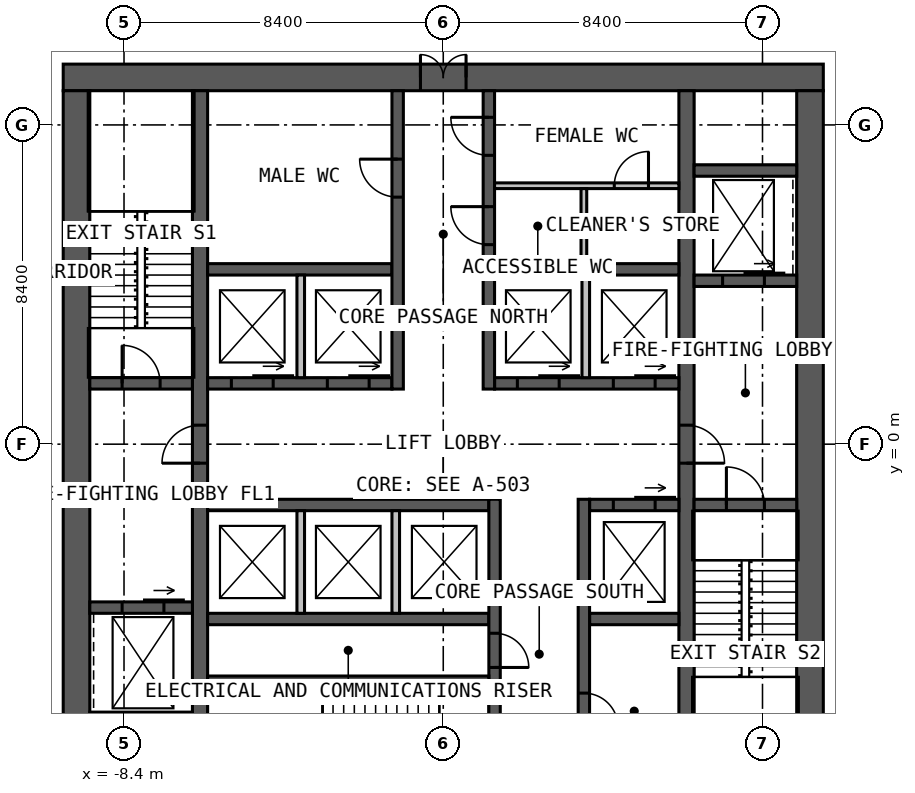
"""IFC4 building model, lengths in metres.
Left out: names, types, materials, properties, quantities, classifications, styles, units other than length and angle.
Written with IfcOpenShell. Run it as: python <this file> out.ifc"""

import sys

from ifc_helpers import new_model, si_unit, direction, frame, frame_2d, origin, place, context, subcontext, project, spatial, rectangle, extrude, element, fill, save


model = new_model("IFC4")
c1 = context("Model", 3, precision=1e-05, world=origin(), true_north=direction((0.0, 1.0)))
c2 = subcontext(c1, "Body", "Model", "MODEL_VIEW")
j1 = project(units=[si_unit("LENGTHUNIT", "METRE"), si_unit("PLANEANGLEUNIT", "RADIAN")], contexts=[c1])
p1 = place(None, origin())
s1 = spatial("IfcSite", under=j1, at=p1, CompositionType="ELEMENT")
p2 = place(p1, origin())
s2 = spatial("IfcBuilding", under=s1, at=p2, CompositionType="ELEMENT")
p3 = place(p2, frame((0.0, 0.0, 94.0)))
s3 = spatial("IfcBuildingStorey", under=s2, at=p3, CompositionType="ELEMENT", Elevation=94.0)
p4 = place(p3, frame((-10.0, 9.65, 0.0), z_axis=(0.0, 0.0, 1.0), x_axis=(1.0, 0.0, 0.0)))
e1 = element("IfcWall", 1, at=p4, inside=s3, PredefinedType="SOLIDWALL", context=c2, shape_type="SweptSolid", body=[
    extrude(rectangle(XDim=20.0, YDim=0.7, at=frame_2d((10.0, 0.0))), origin(), (0.0, 0.0, 1.0), 4.0),
])
p5 = place(p4, frame((9.4, 0.0, 0.0)))
e2 = element("IfcOpeningElement", 2, at=p5, cuts=e1, PredefinedType="OPENING", context=c2, shape_type="SweptSolid", body=[
    extrude(rectangle(XDim=1.2, YDim=2.2, at=frame_2d((0.6, 1.1))), frame((0.0, 0.36, 0.0), z_axis=(0.0, -1.0, 0.0), x_axis=(1.0, 0.0, 0.0)), (0.0, 0.0, 1.0), 0.72),
])
for number, where, z_axis, x_axis in (
    (3, (9.65, -9.3, 0.0), (0.0, 0.0, 1.0), (0.0, 1.0, 0.0)),
    (4, (-9.65, 9.3, 0.0), (0.0, 0.0, 1.0), (0.0, -1.0, 0.0)),
):
    element("IfcWall", number, at=place(p3, frame(where, z_axis=z_axis, x_axis=x_axis)), inside=s3, PredefinedType="SOLIDWALL", context=c2, shape_type="SweptSolid", body=[
        extrude(rectangle(XDim=18.6, YDim=0.7, at=frame_2d((9.3, 0.0))), origin(), (0.0, 0.0, 1.0), 4.0),
    ])
p6 = place(p3, frame((-6.4, -9.3, 0.0), z_axis=(0.0, 0.0, 1.0), x_axis=(0.0, 1.0, 0.0)))
e5 = element("IfcWall", 5, at=p6, inside=s3, PredefinedType="SOLIDWALL", context=c2, shape_type="SweptSolid", body=[
    extrude(rectangle(XDim=18.6, YDim=0.4, at=frame_2d((9.3, 0.0))), origin(), (0.0, 0.0, 1.0), 4.0),
])
p7 = place(p6, frame((8.8, 0.0, 0.0)))
e6 = element("IfcOpeningElement", 6, at=p7, cuts=e5, PredefinedType="OPENING", context=c2, shape_type="SweptSolid", body=[
    extrude(rectangle(XDim=1.0, YDim=2.2, at=frame_2d((0.5, 1.1))), frame((0.0, 0.21, 0.0), z_axis=(0.0, -1.0, 0.0), x_axis=(1.0, 0.0, 0.0)), (0.0, 0.0, 1.0), 0.42),
])
p8 = place(p3, frame((6.4, 9.3, 0.0), z_axis=(0.0, 0.0, 1.0), x_axis=(0.0, -1.0, 0.0)))
e7 = element("IfcWall", 7, at=p8, inside=s3, PredefinedType="SOLIDWALL", context=c2, shape_type="SweptSolid", body=[
    extrude(rectangle(XDim=18.6, YDim=0.4, at=frame_2d((9.3, 0.0))), origin(), (0.0, 0.0, 1.0), 4.0),
])
p9 = place(p8, frame((8.8, 0.0, 0.0)))
e8 = element("IfcOpeningElement", 8, at=p9, cuts=e7, PredefinedType="OPENING", context=c2, shape_type="SweptSolid", body=[
    extrude(rectangle(XDim=1.0, YDim=2.2, at=frame_2d((0.5, 1.1))), frame((0.0, 0.21, 0.0), z_axis=(0.0, -1.0, 0.0), x_axis=(1.0, 0.0, 0.0)), (0.0, 0.0, 1.0), 0.42),
])
p10 = place(p3, frame((-6.2, 1.6, 0.0), z_axis=(0.0, 0.0, 1.0), x_axis=(1.0, 0.0, 0.0)))
e9 = element("IfcWall", 9, at=p10, inside=s3, PredefinedType="SOLIDWALL", context=c2, shape_type="SweptSolid", body=[
    extrude(rectangle(XDim=4.85, YDim=0.3, at=frame_2d((2.425, 0.0))), origin(), (0.0, 0.0, 1.0), 4.0),
])
p11 = place(p10, frame((0.625, 0.0, 0.0)))
e10 = element("IfcOpeningElement", 10, at=p11, cuts=e9, PredefinedType="OPENING", context=c2, shape_type="SweptSolid", body=[
    extrude(rectangle(XDim=1.1, YDim=2.2, at=frame_2d((0.55, 1.1))), frame((0.0, 0.16, 0.0), z_axis=(0.0, -1.0, 0.0), x_axis=(1.0, 0.0, 0.0)), (0.0, 0.0, 1.0), 0.32),
])
p12 = place(p10, frame((3.15, 0.0, 0.0)))
e11 = element("IfcOpeningElement", 11, at=p12, cuts=e9, PredefinedType="OPENING", context=c2, shape_type="SweptSolid", body=[
    extrude(rectangle(XDim=1.1, YDim=2.2, at=frame_2d((0.55, 1.1))), frame((0.0, 0.16, 0.0), z_axis=(0.0, -1.0, 0.0), x_axis=(1.0, 0.0, 0.0)), (0.0, 0.0, 1.0), 0.32),
])
p13 = place(p3, frame((1.35, 1.6, 0.0), z_axis=(0.0, 0.0, 1.0), x_axis=(1.0, 0.0, 0.0)))
e12 = element("IfcWall", 12, at=p13, inside=s3, PredefinedType="SOLIDWALL", context=c2, shape_type="SweptSolid", body=[
    extrude(rectangle(XDim=4.85, YDim=0.3, at=frame_2d((2.425, 0.0))), origin(), (0.0, 0.0, 1.0), 4.0),
])
p14 = place(p13, frame((0.6, 0.0, 0.0)))
e13 = element("IfcOpeningElement", 13, at=p14, cuts=e12, PredefinedType="OPENING", context=c2, shape_type="SweptSolid", body=[
    extrude(rectangle(XDim=1.1, YDim=2.2, at=frame_2d((0.55, 1.1))), frame((0.0, 0.16, 0.0), z_axis=(0.0, -1.0, 0.0), x_axis=(1.0, 0.0, 0.0)), (0.0, 0.0, 1.0), 0.32),
])
p15 = place(p13, frame((3.125, 0.0, 0.0)))
e14 = element("IfcOpeningElement", 14, at=p15, cuts=e12, PredefinedType="OPENING", context=c2, shape_type="SweptSolid", body=[
    extrude(rectangle(XDim=1.1, YDim=2.2, at=frame_2d((0.55, 1.1))), frame((0.0, 0.16, 0.0), z_axis=(0.0, -1.0, 0.0), x_axis=(1.0, 0.0, 0.0)), (0.0, 0.0, 1.0), 0.32),
])
for number, where, z_axis, x_axis in (
    (15, (-6.2, 4.6, 0.0), (0.0, 0.0, 1.0), (1.0, 0.0, 0.0)),
    (16, (1.35, 4.6, 0.0), (0.0, 0.0, 1.0), (1.0, 0.0, 0.0)),
):
    element("IfcWall", number, at=place(p3, frame(where, z_axis=z_axis, x_axis=x_axis)), inside=s3, PredefinedType="SOLIDWALL", context=c2, shape_type="SweptSolid", body=[
        extrude(rectangle(XDim=4.85, YDim=0.3, at=frame_2d((2.425, 0.0))), origin(), (0.0, 0.0, 1.0), 4.0),
    ])
p16 = place(p3, frame((-1.2, 1.45, 0.0), z_axis=(0.0, 0.0, 1.0), x_axis=(0.0, 1.0, 0.0)))
e17 = element("IfcWall", 17, at=p16, inside=s3, PredefinedType="SOLIDWALL", context=c2, shape_type="SweptSolid", body=[
    extrude(rectangle(XDim=7.85, YDim=0.3, at=frame_2d((3.925, 0.0))), origin(), (0.0, 0.0, 1.0), 4.0),
])
p17 = place(p16, frame((5.05, 0.0, 0.0)))
e18 = element("IfcOpeningElement", 18, at=p17, cuts=e17, PredefinedType="OPENING", context=c2, shape_type="SweptSolid", body=[
    extrude(rectangle(XDim=1.0, YDim=2.2, at=frame_2d((0.5, 1.1))), frame((0.0, 0.16, 0.0), z_axis=(0.0, -1.0, 0.0), x_axis=(1.0, 0.0, 0.0)), (0.0, 0.0, 1.0), 0.32),
])
p18 = place(p3, frame((1.2, 1.45, 0.0), z_axis=(0.0, 0.0, 1.0), x_axis=(0.0, 1.0, 0.0)))
e19 = element("IfcWall", 19, at=p18, inside=s3, PredefinedType="SOLIDWALL", context=c2, shape_type="SweptSolid", body=[
    extrude(rectangle(XDim=7.85, YDim=0.3, at=frame_2d((3.925, 0.0))), origin(), (0.0, 0.0, 1.0), 4.0),
])
p19 = place(p18, frame((3.8, 0.0, 0.0)))
e20 = element("IfcOpeningElement", 20, at=p19, cuts=e19, PredefinedType="OPENING", context=c2, shape_type="SweptSolid", body=[
    extrude(rectangle(XDim=1.0, YDim=2.2, at=frame_2d((0.5, 1.1))), frame((0.0, 0.16, 0.0), z_axis=(0.0, -1.0, 0.0), x_axis=(1.0, 0.0, 0.0)), (0.0, 0.0, 1.0), 0.32),
])
p20 = place(p18, frame((6.15, 0.0, 0.0)))
e21 = element("IfcOpeningElement", 21, at=p20, cuts=e19, PredefinedType="OPENING", context=c2, shape_type="SweptSolid", body=[
    extrude(rectangle(XDim=1.0, YDim=2.2, at=frame_2d((0.5, 1.1))), frame((0.0, 0.16, 0.0), z_axis=(0.0, -1.0, 0.0), x_axis=(1.0, 0.0, 0.0)), (0.0, 0.0, 1.0), 0.32),
])
p21 = place(p3, frame((-6.2, -1.6, 0.0), z_axis=(0.0, 0.0, 1.0), x_axis=(1.0, 0.0, 0.0)))
e22 = element("IfcWall", 22, at=p21, inside=s3, PredefinedType="SOLIDWALL", context=c2, shape_type="SweptSolid", body=[
    extrude(rectangle(XDim=7.4, YDim=0.3, at=frame_2d((3.7, 0.0))), origin(), (0.0, 0.0, 1.0), 4.0),
])
p22 = place(p3, frame((3.85, -1.6, 0.0), z_axis=(0.0, 0.0, 1.0), x_axis=(1.0, 0.0, 0.0)))
e23 = element("IfcWall", 23, at=p22, inside=s3, PredefinedType="SOLIDWALL", context=c2, shape_type="SweptSolid", body=[
    extrude(rectangle(XDim=2.35, YDim=0.3, at=frame_2d((1.175, 0.0))), origin(), (0.0, 0.0, 1.0), 4.0),
])
p23 = place(p22, frame((0.625, 0.0, 0.0)))
e24 = element("IfcOpeningElement", 24, at=p23, cuts=e23, PredefinedType="OPENING", context=c2, shape_type="SweptSolid", body=[
    extrude(rectangle(XDim=1.1, YDim=2.2, at=frame_2d((0.55, 1.1))), frame((0.0, 0.16, 0.0), z_axis=(0.0, -1.0, 0.0), x_axis=(1.0, 0.0, 0.0)), (0.0, 0.0, 1.0), 0.32),
])
p24 = place(p3, frame((-6.2, -4.6, 0.0), z_axis=(0.0, 0.0, 1.0), x_axis=(1.0, 0.0, 0.0)))
e25 = element("IfcWall", 25, at=p24, inside=s3, PredefinedType="SOLIDWALL", context=c2, shape_type="SweptSolid", body=[
    extrude(rectangle(XDim=7.4, YDim=0.3, at=frame_2d((3.7, 0.0))), origin(), (0.0, 0.0, 1.0), 4.0),
])
p25 = place(p3, frame((3.85, -4.6, 0.0), z_axis=(0.0, 0.0, 1.0), x_axis=(1.0, 0.0, 0.0)))
e26 = element("IfcWall", 26, at=p25, inside=s3, PredefinedType="SOLIDWALL", context=c2, shape_type="SweptSolid", body=[
    extrude(rectangle(XDim=2.35, YDim=0.3, at=frame_2d((1.175, 0.0))), origin(), (0.0, 0.0, 1.0), 4.0),
])
p26 = place(p3, frame((1.35, -1.45, 0.0), z_axis=(0.0, 0.0, 1.0), x_axis=(0.0, -1.0, 0.0)))
e27 = element("IfcWall", 27, at=p26, inside=s3, PredefinedType="SOLIDWALL", context=c2, shape_type="SweptSolid", body=[
    extrude(rectangle(XDim=7.85, YDim=0.3, at=frame_2d((3.925, 0.0))), origin(), (0.0, 0.0, 1.0), 4.0),
])
p27 = place(p26, frame((5.85, 0.0, 0.0)))
e28 = element("IfcOpeningElement", 28, at=p27, cuts=e27, PredefinedType="OPENING", context=c2, shape_type="SweptSolid", body=[
    extrude(rectangle(XDim=1.0, YDim=2.2, at=frame_2d((0.5, 1.1))), frame((0.0, 0.16, 0.0), z_axis=(0.0, -1.0, 0.0), x_axis=(1.0, 0.0, 0.0)), (0.0, 0.0, 1.0), 0.32),
])
p28 = place(p26, frame((3.525, 0.0, 0.0)))
e29 = element("IfcOpeningElement", 29, at=p28, cuts=e27, PredefinedType="OPENING", context=c2, shape_type="SweptSolid", body=[
    extrude(rectangle(XDim=0.9, YDim=2.2, at=frame_2d((0.45, 1.1))), frame((0.0, 0.16, 0.0), z_axis=(0.0, -1.0, 0.0), x_axis=(1.0, 0.0, 0.0)), (0.0, 0.0, 1.0), 0.32),
])
p29 = place(p3, frame((3.7, -1.45, 0.0), z_axis=(0.0, 0.0, 1.0), x_axis=(0.0, -1.0, 0.0)))
e30 = element("IfcWall", 30, at=p29, inside=s3, PredefinedType="SOLIDWALL", context=c2, shape_type="SweptSolid", body=[
    extrude(rectangle(XDim=7.85, YDim=0.3, at=frame_2d((3.925, 0.0))), origin(), (0.0, 0.0, 1.0), 4.0),
])
p30 = place(p29, frame((5.1, 0.0, 0.0)))
e31 = element("IfcOpeningElement", 31, at=p30, cuts=e30, PredefinedType="OPENING", context=c2, shape_type="SweptSolid", body=[
    extrude(rectangle(XDim=0.9, YDim=2.2, at=frame_2d((0.45, 1.1))), frame((0.0, 0.16, 0.0), z_axis=(0.0, -1.0, 0.0), x_axis=(1.0, 0.0, 0.0)), (0.0, 0.0, 1.0), 0.32),
])
p31 = place(p3, frame((-6.2, -6.2, 0.0), z_axis=(0.0, 0.0, 1.0), x_axis=(1.0, 0.0, 0.0)))
e32 = element("IfcWall", 32, at=p31, inside=s3, PredefinedType="SOLIDWALL", context=c2, shape_type="SweptSolid", body=[
    extrude(rectangle(XDim=7.4, YDim=0.2, at=frame_2d((3.7, 0.0))), origin(), (0.0, 0.0, 1.0), 4.0),
])
p32 = place(p3, frame((-9.3, 1.6, 0.0), z_axis=(0.0, 0.0, 1.0), x_axis=(1.0, 0.0, 0.0)))
e33 = element("IfcWall", 33, at=p32, inside=s3, PredefinedType="SOLIDWALL", context=c2, shape_type="SweptSolid", body=[
    extrude(rectangle(XDim=2.7, YDim=0.3, at=frame_2d((1.35, 0.0))), origin(), (0.0, 0.0, 1.0), 4.0),
])
p33 = place(p32, frame((0.85, 0.0, 0.0)))
e34 = element("IfcOpeningElement", 34, at=p33, cuts=e33, PredefinedType="OPENING", context=c2, shape_type="SweptSolid", body=[
    extrude(rectangle(XDim=1.0, YDim=2.2, at=frame_2d((0.5, 1.1))), frame((0.0, 0.16, 0.0), z_axis=(0.0, -1.0, 0.0), x_axis=(1.0, 0.0, 0.0)), (0.0, 0.0, 1.0), 0.32),
])
p34 = place(p3, frame((6.6, -1.6, 0.0), z_axis=(0.0, 0.0, 1.0), x_axis=(1.0, 0.0, 0.0)))
e35 = element("IfcWall", 35, at=p34, inside=s3, PredefinedType="SOLIDWALL", context=c2, shape_type="SweptSolid", body=[
    extrude(rectangle(XDim=2.7, YDim=0.3, at=frame_2d((1.35, 0.0))), origin(), (0.0, 0.0, 1.0), 4.0),
])
p35 = place(p34, frame((0.85, 0.0, 0.0)))
e36 = element("IfcOpeningElement", 36, at=p35, cuts=e35, PredefinedType="OPENING", context=c2, shape_type="SweptSolid", body=[
    extrude(rectangle(XDim=1.0, YDim=2.2, at=frame_2d((0.5, 1.1))), frame((0.0, 0.16, 0.0), z_axis=(0.0, -1.0, 0.0), x_axis=(1.0, 0.0, 0.0)), (0.0, 0.0, 1.0), 0.32),
])
p36 = place(p3, frame((-9.3, -4.3, 0.0), z_axis=(0.0, 0.0, 1.0), x_axis=(1.0, 0.0, 0.0)))
e37 = element("IfcWall", 37, at=p36, inside=s3, PredefinedType="SOLIDWALL", context=c2, shape_type="SweptSolid", body=[
    extrude(rectangle(XDim=2.7, YDim=0.3, at=frame_2d((1.35, 0.0))), origin(), (0.0, 0.0, 1.0), 4.0),
])
p37 = place(p36, frame((0.85, 0.0, 0.0)))
e38 = element("IfcOpeningElement", 38, at=p37, cuts=e37, PredefinedType="OPENING", context=c2, shape_type="SweptSolid", body=[
    extrude(rectangle(XDim=1.1, YDim=2.2, at=frame_2d((0.55, 1.1))), frame((0.0, 0.16, 0.0), z_axis=(0.0, -1.0, 0.0), x_axis=(1.0, 0.0, 0.0)), (0.0, 0.0, 1.0), 0.32),
])
p38 = place(p3, frame((6.6, 4.3, 0.0), z_axis=(0.0, 0.0, 1.0), x_axis=(1.0, 0.0, 0.0)))
e39 = element("IfcWall", 39, at=p38, inside=s3, PredefinedType="SOLIDWALL", context=c2, shape_type="SweptSolid", body=[
    extrude(rectangle(XDim=2.7, YDim=0.3, at=frame_2d((1.35, 0.0))), origin(), (0.0, 0.0, 1.0), 4.0),
])
p39 = place(p38, frame((0.75, 0.0, 0.0)))
e40 = element("IfcOpeningElement", 40, at=p39, cuts=e39, PredefinedType="OPENING", context=c2, shape_type="SweptSolid", body=[
    extrude(rectangle(XDim=1.1, YDim=2.2, at=frame_2d((0.55, 1.1))), frame((0.0, 0.16, 0.0), z_axis=(0.0, -1.0, 0.0), x_axis=(1.0, 0.0, 0.0)), (0.0, 0.0, 1.0), 0.32),
])
for number, where, z_axis, x_axis in (
    (41, (-9.3, -7.2, 0.0), (0.0, 0.0, 1.0), (1.0, 0.0, 0.0)),
    (42, (6.6, 7.2, 0.0), (0.0, 0.0, 1.0), (1.0, 0.0, 0.0)),
):
    element("IfcWall", number, at=place(p3, frame(where, z_axis=z_axis, x_axis=x_axis)), inside=s3, PredefinedType="SOLIDWALL", context=c2, shape_type="SweptSolid", body=[
        extrude(rectangle(XDim=2.7, YDim=0.3, at=frame_2d((1.35, 0.0))), origin(), (0.0, 0.0, 1.0), 4.0),
    ])
for number, where, z_axis, x_axis in (
    (43, (-3.75, 1.75, 0.0), (0.0, 0.0, 1.0), (0.0, 1.0, 0.0)),
    (44, (3.75, 1.75, 0.0), (0.0, 0.0, 1.0), (0.0, 1.0, 0.0)),
    (45, (-3.75, -1.75, 0.0), (0.0, 0.0, 1.0), (0.0, -1.0, 0.0)),
    (46, (-1.25, -1.75, 0.0), (0.0, 0.0, 1.0), (0.0, -1.0, 0.0)),
):
    element("IfcWall", number, at=place(p3, frame(where, z_axis=z_axis, x_axis=x_axis)), inside=s3, PredefinedType="SOLIDWALL", context=c2, shape_type="SweptSolid", body=[
        extrude(rectangle(XDim=2.7, YDim=0.2, at=frame_2d((1.35, 0.0))), origin(), (0.0, 0.0, 1.0), 3.75),
    ])
p40 = place(p3, frame((1.35, 6.8, 0.0), z_axis=(0.0, 0.0, 1.0), x_axis=(1.0, 0.0, 0.0)))
e47 = element("IfcWall", 47, at=p40, inside=s3, PredefinedType="PARTITIONING", context=c2, shape_type="SweptSolid", body=[
    extrude(rectangle(XDim=4.85, YDim=0.15, at=frame_2d((2.425, 0.0))), origin(), (0.0, 0.0, 1.0), 3.75),
])
p41 = place(p40, frame((3.15, 0.0, 0.0)))
e48 = element("IfcOpeningElement", 48, at=p41, cuts=e47, PredefinedType="OPENING", context=c2, shape_type="SweptSolid", body=[
    extrude(rectangle(XDim=0.9, YDim=2.2, at=frame_2d((0.45, 1.1))), frame((0.0, 0.085, 0.0), z_axis=(0.0, -1.0, 0.0), x_axis=(1.0, 0.0, 0.0)), (0.0, 0.0, 1.0), 0.17),
])
p42 = place(p3, frame((3.7, 4.75, 0.0), z_axis=(0.0, 0.0, 1.0), x_axis=(0.0, 1.0, 0.0)))
e49 = element("IfcWall", 49, at=p42, inside=s3, PredefinedType="PARTITIONING", context=c2, shape_type="SweptSolid", body=[
    extrude(rectangle(XDim=1.975, YDim=0.15, at=frame_2d((0.988, 0.0))), origin(), (0.0, 0.0, 1.0), 3.75),
])
p43 = place(p5, origin())
e50 = element("IfcDoor", 50, at=p43, inside=s3, OperationType="DOUBLE_DOOR_SINGLE_SWING", PredefinedType="DOOR", context=c2, shape_type="SweptSolid", body=[
    extrude(rectangle(XDim=1.2, YDim=2.2, at=frame_2d((0.6, 1.1))), frame((0.0, 0.025, 0.0), z_axis=(0.0, -1.0, 0.0), x_axis=(1.0, 0.0, 0.0)), (0.0, 0.0, 1.0), 0.05),
])
fill(e2, e50)
p44 = place(p7, origin())
e51 = element("IfcDoor", 51, at=p44, inside=s3, OperationType="SINGLE_SWING_LEFT", PredefinedType="DOOR", context=c2, shape_type="SweptSolid", body=[
    extrude(rectangle(XDim=1.0, YDim=2.2, at=frame_2d((0.5, 1.1))), frame((0.0, 0.025, 0.0), z_axis=(0.0, -1.0, 0.0), x_axis=(1.0, 0.0, 0.0)), (0.0, 0.0, 1.0), 0.05),
])
fill(e6, e51)
p45 = place(p9, origin())
e52 = element("IfcDoor", 52, at=p45, inside=s3, OperationType="SINGLE_SWING_RIGHT", PredefinedType="DOOR", context=c2, shape_type="SweptSolid", body=[
    extrude(rectangle(XDim=1.0, YDim=2.2, at=frame_2d((0.5, 1.1))), frame((0.0, 0.025, 0.0), z_axis=(0.0, -1.0, 0.0), x_axis=(1.0, 0.0, 0.0)), (0.0, 0.0, 1.0), 0.05),
])
fill(e8, e52)
p46 = place(p33, origin())
e53 = element("IfcDoor", 53, at=p46, inside=s3, OperationType="SINGLE_SWING_LEFT", PredefinedType="DOOR", context=c2, shape_type="SweptSolid", body=[
    extrude(rectangle(XDim=1.0, YDim=2.2, at=frame_2d((0.5, 1.1))), frame((0.0, 0.025, 0.0), z_axis=(0.0, -1.0, 0.0), x_axis=(1.0, 0.0, 0.0)), (0.0, 0.0, 1.0), 0.05),
])
fill(e34, e53)
p47 = place(p35, origin())
e54 = element("IfcDoor", 54, at=p47, inside=s3, OperationType="SINGLE_SWING_LEFT", PredefinedType="DOOR", context=c2, shape_type="SweptSolid", body=[
    extrude(rectangle(XDim=1.0, YDim=2.2, at=frame_2d((0.5, 1.1))), frame((0.0, 0.025, 0.0), z_axis=(0.0, -1.0, 0.0), x_axis=(1.0, 0.0, 0.0)), (0.0, 0.0, 1.0), 0.05),
])
fill(e36, e54)
p48 = place(p17, origin())
e55 = element("IfcDoor", 55, at=p48, inside=s3, OperationType="SINGLE_SWING_RIGHT", PredefinedType="DOOR", context=c2, shape_type="SweptSolid", body=[
    extrude(rectangle(XDim=1.0, YDim=2.2, at=frame_2d((0.5, 1.1))), frame((0.0, 0.025, 0.0), z_axis=(0.0, -1.0, 0.0), x_axis=(1.0, 0.0, 0.0)), (0.0, 0.0, 1.0), 0.05),
])
fill(e18, e55)
p49 = place(p19, origin())
e56 = element("IfcDoor", 56, at=p49, inside=s3, OperationType="SINGLE_SWING_RIGHT", PredefinedType="DOOR", context=c2, shape_type="SweptSolid", body=[
    extrude(rectangle(XDim=1.0, YDim=2.2, at=frame_2d((0.5, 1.1))), frame((0.0, 0.025, 0.0), z_axis=(0.0, -1.0, 0.0), x_axis=(1.0, 0.0, 0.0)), (0.0, 0.0, 1.0), 0.05),
])
fill(e20, e56)
p50 = place(p20, origin())
e57 = element("IfcDoor", 57, at=p50, inside=s3, OperationType="SINGLE_SWING_RIGHT", PredefinedType="DOOR", context=c2, shape_type="SweptSolid", body=[
    extrude(rectangle(XDim=1.0, YDim=2.2, at=frame_2d((0.5, 1.1))), frame((0.0, 0.025, 0.0), z_axis=(0.0, -1.0, 0.0), x_axis=(1.0, 0.0, 0.0)), (0.0, 0.0, 1.0), 0.05),
])
fill(e21, e57)
p51 = place(p28, origin())
e58 = element("IfcDoor", 58, at=p51, inside=s3, OperationType="SINGLE_SWING_RIGHT", PredefinedType="DOOR", context=c2, shape_type="SweptSolid", body=[
    extrude(rectangle(XDim=0.9, YDim=2.2, at=frame_2d((0.45, 1.1))), frame((0.0, 0.025, 0.0), z_axis=(0.0, -1.0, 0.0), x_axis=(1.0, 0.0, 0.0)), (0.0, 0.0, 1.0), 0.05),
])
fill(e29, e58)
p52 = place(p30, origin())
e59 = element("IfcDoor", 59, at=p52, inside=s3, OperationType="SINGLE_SWING_RIGHT", PredefinedType="DOOR", context=c2, shape_type="SweptSolid", body=[
    extrude(rectangle(XDim=0.9, YDim=2.2, at=frame_2d((0.45, 1.1))), frame((0.0, 0.025, 0.0), z_axis=(0.0, -1.0, 0.0), x_axis=(1.0, 0.0, 0.0)), (0.0, 0.0, 1.0), 0.05),
])
fill(e31, e59)
p53 = place(p41, origin())
e60 = element("IfcDoor", 60, at=p53, inside=s3, OperationType="SINGLE_SWING_RIGHT", PredefinedType="DOOR", context=c2, shape_type="SweptSolid", body=[
    extrude(rectangle(XDim=0.9, YDim=2.2, at=frame_2d((0.45, 1.1))), frame((0.0, 0.025, 0.0), z_axis=(0.0, -1.0, 0.0), x_axis=(1.0, 0.0, 0.0)), (0.0, 0.0, 1.0), 0.05),
])
fill(e48, e60)
p54 = place(p11, origin())
e61 = element("IfcDoor", 61, at=p54, inside=s3, OperationType="SLIDING_TO_LEFT", PredefinedType="DOOR", context=c2, shape_type="SweptSolid", body=[
    extrude(rectangle(XDim=1.1, YDim=2.2, at=frame_2d((0.55, 1.1))), frame((0.0, 0.025, 0.0), z_axis=(0.0, -1.0, 0.0), x_axis=(1.0, 0.0, 0.0)), (0.0, 0.0, 1.0), 0.05),
])
fill(e10, e61)
p55 = place(p12, origin())
e62 = element("IfcDoor", 62, at=p55, inside=s3, OperationType="SLIDING_TO_LEFT", PredefinedType="DOOR", context=c2, shape_type="SweptSolid", body=[
    extrude(rectangle(XDim=1.1, YDim=2.2, at=frame_2d((0.55, 1.1))), frame((0.0, 0.025, 0.0), z_axis=(0.0, -1.0, 0.0), x_axis=(1.0, 0.0, 0.0)), (0.0, 0.0, 1.0), 0.05),
])
fill(e11, e62)
p56 = place(p14, origin())
e63 = element("IfcDoor", 63, at=p56, inside=s3, OperationType="SLIDING_TO_LEFT", PredefinedType="DOOR", context=c2, shape_type="SweptSolid", body=[
    extrude(rectangle(XDim=1.1, YDim=2.2, at=frame_2d((0.55, 1.1))), frame((0.0, 0.025, 0.0), z_axis=(0.0, -1.0, 0.0), x_axis=(1.0, 0.0, 0.0)), (0.0, 0.0, 1.0), 0.05),
])
fill(e13, e63)
p57 = place(p15, origin())
e64 = element("IfcDoor", 64, at=p57, inside=s3, OperationType="SLIDING_TO_LEFT", PredefinedType="DOOR", context=c2, shape_type="SweptSolid", body=[
    extrude(rectangle(XDim=1.1, YDim=2.2, at=frame_2d((0.55, 1.1))), frame((0.0, 0.025, 0.0), z_axis=(0.0, -1.0, 0.0), x_axis=(1.0, 0.0, 0.0)), (0.0, 0.0, 1.0), 0.05),
])
fill(e14, e64)
p58 = place(p23, origin())
e65 = element("IfcDoor", 65, at=p58, inside=s3, OperationType="SLIDING_TO_LEFT", PredefinedType="DOOR", context=c2, shape_type="SweptSolid", body=[
    extrude(rectangle(XDim=1.1, YDim=2.2, at=frame_2d((0.55, 1.1))), frame((0.0, 0.025, 0.0), z_axis=(0.0, -1.0, 0.0), x_axis=(1.0, 0.0, 0.0)), (0.0, 0.0, 1.0), 0.05),
])
fill(e24, e65)
p59 = place(p37, origin())
e66 = element("IfcDoor", 66, at=p59, inside=s3, OperationType="SLIDING_TO_LEFT", PredefinedType="DOOR", context=c2, shape_type="SweptSolid", body=[
    extrude(rectangle(XDim=1.1, YDim=2.2, at=frame_2d((0.55, 1.1))), frame((0.0, 0.025, 0.0), z_axis=(0.0, -1.0, 0.0), x_axis=(1.0, 0.0, 0.0)), (0.0, 0.0, 1.0), 0.05),
])
fill(e38, e66)
p60 = place(p39, origin())
e67 = element("IfcDoor", 67, at=p60, inside=s3, OperationType="SLIDING_TO_LEFT", PredefinedType="DOOR", context=c2, shape_type="SweptSolid", body=[
    extrude(rectangle(XDim=1.1, YDim=2.2, at=frame_2d((0.55, 1.1))), frame((0.0, 0.025, 0.0), z_axis=(0.0, -1.0, 0.0), x_axis=(1.0, 0.0, 0.0)), (0.0, 0.0, 1.0), 0.05),
])
fill(e40, e67)
save(model, sys.argv[1])
